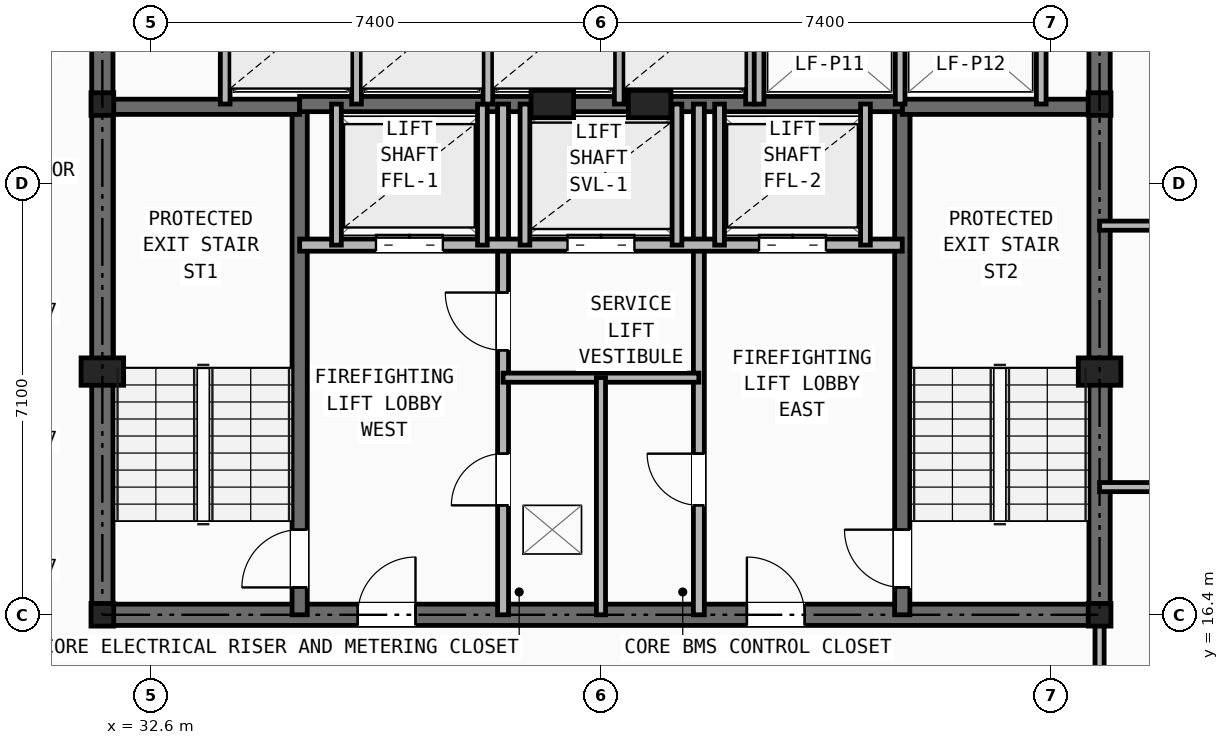
"""IFC4 building model, lengths in metres.
Left out: names, types, materials, properties, quantities, classifications, styles, units other than length and angle.
Written with IfcOpenShell. Run it as: python <this file> out.ifc"""

import sys

from ifc_helpers import new_model, si_unit, direction, frame, frame_2d, origin, origin_2d, place, context, subcontext, project, spatial, rectangle, i_section, extrude, element, fill, save


model = new_model("IFC4")
c1 = context("Model", 3, precision=1e-05, world=origin(), true_north=direction((0.0, 1.0)))
c2 = subcontext(c1, "Body", "Model", "MODEL_VIEW")
j1 = project(units=[si_unit("LENGTHUNIT", "METRE"), si_unit("PLANEANGLEUNIT", "RADIAN")], contexts=[c1])
p1 = place(None, origin())
s1 = spatial("IfcSite", under=j1, at=p1, CompositionType="ELEMENT")
p2 = place(p1, origin())
s2 = spatial("IfcBuilding", under=s1, at=p2, CompositionType="ELEMENT")
p3 = place(p2, frame((0.0, 0.0, 165.45)))
s3 = spatial("IfcBuildingStorey", under=s2, at=p3, CompositionType="ELEMENT", Elevation=165.45)
for number, where, z_axis, x_axis in (
    (1, (31.8, 16.4, 0.0), (0.0, 0.0, 1.0), (1.0, 0.0, 0.0)),
    (2, (48.2, 16.4, 0.0), (0.0, 0.0, 1.0), (1.0, 0.0, 0.0)),
    (3, (31.8, 24.8, 0.0), (0.0, 0.0, 1.0), (1.0, 0.0, 0.0)),
    (4, (48.2, 24.8, 0.0), (0.0, 0.0, 1.0), (1.0, 0.0, 0.0)),
):
    element("IfcColumn", number, at=place(p3, frame(where, z_axis=z_axis, x_axis=x_axis)), inside=s3, PredefinedType="COLUMN", context=c2, shape_type="SweptSolid", body=[
        extrude(i_section(OverallWidth=0.374, OverallDepth=0.372, WebThickness=0.016, FlangeThickness=0.026, at=origin_2d()), origin(), (0.0, 0.0, 1.0), 3.45),
    ])
for number, where, z_axis, x_axis in (
    (5, (31.8, 20.4, 0.0), (0.0, 0.0, 1.0), (1.0, 0.0, 0.0)),
    (6, (48.2, 20.4, 0.0), (0.0, 0.0, 1.0), (1.0, 0.0, 0.0)),
    (7, (39.2, 24.8, 0.0), (0.0, 0.0, 1.0), (1.0, 0.0, 0.0)),
    (8, (40.8, 24.8, 0.0), (0.0, 0.0, 1.0), (1.0, 0.0, 0.0)),
):
    element("IfcColumn", number, at=place(p3, frame(where, z_axis=z_axis, x_axis=x_axis)), inside=s3, PredefinedType="PILASTER", context=c2, shape_type="SweptSolid", body=[
        extrude(rectangle(XDim=0.7, YDim=0.45, at=origin_2d()), origin(), (0.0, 0.0, 1.0), 3.45),
    ])
p4 = place(p3, frame((31.8, 16.4, 0.0), z_axis=(0.0, 0.0, 1.0), x_axis=(1.0, 0.0, 0.0)))
e9 = element("IfcWall", 9, at=p4, inside=s3, PredefinedType="SHEAR", context=c2, shape_type="SweptSolid", body=[
    extrude(rectangle(XDim=16.4, YDim=0.35, at=frame_2d((8.2, 0.0))), origin(), (0.0, 0.0, 1.0), 3.21),
])
p5 = place(p4, frame((4.2, 0.0, 0.0)))
e10 = element("IfcOpeningElement", 10, at=p5, cuts=e9, PredefinedType="OPENING", context=c2, shape_type="SweptSolid", body=[
    extrude(rectangle(XDim=0.95, YDim=2.1, at=frame_2d((0.475, 1.05))), frame((0.0, 0.185, 0.0), z_axis=(0.0, -1.0, 0.0), x_axis=(1.0, 0.0, 0.0)), (0.0, 0.0, 1.0), 0.37),
])
p6 = place(p4, frame((10.6, 0.0, 0.0)))
e11 = element("IfcOpeningElement", 11, at=p6, cuts=e9, PredefinedType="OPENING", context=c2, shape_type="SweptSolid", body=[
    extrude(rectangle(XDim=0.95, YDim=2.1, at=frame_2d((0.475, 1.05))), frame((0.0, 0.185, 0.0), z_axis=(0.0, -1.0, 0.0), x_axis=(1.0, 0.0, 0.0)), (0.0, 0.0, 1.0), 0.37),
])
p7 = place(p3, frame((31.8, 16.4, 0.0), z_axis=(0.0, 0.0, 1.0), x_axis=(0.0, 1.0, 0.0)))
e12 = element("IfcWall", 12, at=p7, inside=s3, PredefinedType="SHEAR", context=c2, shape_type="SweptSolid", body=[
    extrude(rectangle(XDim=14.8, YDim=0.35, at=frame_2d((7.4, 0.0))), origin(), (0.0, 0.0, 1.0), 3.21),
])
p8 = place(p7, frame((11.0, 0.0, 0.0)))
e13 = element("IfcOpeningElement", 13, at=p8, cuts=e12, PredefinedType="OPENING", context=c2, shape_type="SweptSolid", body=[
    extrude(rectangle(XDim=1.1, YDim=2.15, at=frame_2d((0.55, 1.075))), frame((0.0, 0.185, 0.0), z_axis=(0.0, -1.0, 0.0), x_axis=(1.0, 0.0, 0.0)), (0.0, 0.0, 1.0), 0.37),
])
p9 = place(p3, frame((48.2, 16.4, 0.0), z_axis=(0.0, 0.0, 1.0), x_axis=(0.0, 1.0, 0.0)))
e14 = element("IfcWall", 14, at=p9, inside=s3, PredefinedType="SHEAR", context=c2, shape_type="SweptSolid", body=[
    extrude(rectangle(XDim=14.8, YDim=0.35, at=frame_2d((7.4, 0.0))), origin(), (0.0, 0.0, 1.0), 3.21),
])
p10 = place(p9, frame((11.0, 0.0, 0.0)))
e15 = element("IfcOpeningElement", 15, at=p10, cuts=e14, PredefinedType="OPENING", context=c2, shape_type="SweptSolid", body=[
    extrude(rectangle(XDim=1.1, YDim=2.15, at=frame_2d((0.55, 1.075))), frame((0.0, 0.185, 0.0), z_axis=(0.0, -1.0, 0.0), x_axis=(1.0, 0.0, 0.0)), (0.0, 0.0, 1.0), 0.37),
])
p11 = place(p3, frame((35.045, 16.4, 0.0), z_axis=(0.0, 0.0, 1.0), x_axis=(0.0, 1.0, 0.0)))
e16 = element("IfcWall", 16, at=p11, inside=s3, PredefinedType="SHEAR", context=c2, shape_type="SweptSolid", body=[
    extrude(rectangle(XDim=8.4, YDim=0.25, at=frame_2d((4.2, 0.0))), origin(), (0.0, 0.0, 1.0), 3.21),
])
p12 = place(p11, frame((0.45, 0.0, 0.0)))
e17 = element("IfcOpeningElement", 17, at=p12, cuts=e16, PredefinedType="OPENING", context=c2, shape_type="SweptSolid", body=[
    extrude(rectangle(XDim=0.95, YDim=2.1, at=frame_2d((0.475, 1.05))), frame((0.0, 0.135, 0.0), z_axis=(0.0, -1.0, 0.0), x_axis=(1.0, 0.0, 0.0)), (0.0, 0.0, 1.0), 0.27),
])
p13 = place(p3, frame((31.8, 24.755, 0.0), z_axis=(0.0, 0.0, 1.0), x_axis=(1.0, 0.0, 0.0)))
e18 = element("IfcWall", 18, at=p13, inside=s3, PredefinedType="SHEAR", context=c2, shape_type="SweptSolid", body=[
    extrude(rectangle(XDim=3.245, YDim=0.25, at=frame_2d((1.623, 0.0))), origin(), (0.0, 0.0, 1.0), 3.21),
])
p14 = place(p3, frame((44.955, 16.4, 0.0), z_axis=(0.0, 0.0, 1.0), x_axis=(0.0, 1.0, 0.0)))
e19 = element("IfcWall", 19, at=p14, inside=s3, PredefinedType="SHEAR", context=c2, shape_type="SweptSolid", body=[
    extrude(rectangle(XDim=8.4, YDim=0.25, at=frame_2d((4.2, 0.0))), origin(), (0.0, 0.0, 1.0), 3.21),
])
p15 = place(p14, frame((0.45, 0.0, 0.0)))
e20 = element("IfcOpeningElement", 20, at=p15, cuts=e19, PredefinedType="OPENING", context=c2, shape_type="SweptSolid", body=[
    extrude(rectangle(XDim=0.95, YDim=2.1, at=frame_2d((0.475, 1.05))), frame((0.0, 0.135, 0.0), z_axis=(0.0, -1.0, 0.0), x_axis=(1.0, 0.0, 0.0)), (0.0, 0.0, 1.0), 0.27),
])
p16 = place(p3, frame((44.955, 24.755, 0.0), z_axis=(0.0, 0.0, 1.0), x_axis=(1.0, 0.0, 0.0)))
e21 = element("IfcWall", 21, at=p16, inside=s3, PredefinedType="SHEAR", context=c2, shape_type="SweptSolid", body=[
    extrude(rectangle(XDim=3.245, YDim=0.25, at=frame_2d((1.623, 0.0))), origin(), (0.0, 0.0, 1.0), 3.21),
])
p17 = place(p3, frame((35.045, 24.8, 0.0), z_axis=(0.0, 0.0, 1.0), x_axis=(1.0, 0.0, 0.0)))
e22 = element("IfcWall", 22, at=p17, inside=s3, PredefinedType="SHEAR", context=c2, shape_type="SweptSolid", body=[
    extrude(rectangle(XDim=9.91, YDim=0.25, at=frame_2d((4.955, 0.0))), origin(), (0.0, 0.0, 1.0), 3.21),
])
p18 = place(p3, frame((38.39, 16.4, 0.0), z_axis=(0.0, 0.0, 1.0), x_axis=(0.0, 1.0, 0.0)))
e23 = element("IfcWall", 23, at=p18, inside=s3, PredefinedType="PARTITIONING", context=c2, shape_type="SweptSolid", body=[
    extrude(rectangle(XDim=8.4, YDim=0.18, at=frame_2d((4.2, 0.0))), origin(), (0.0, 0.0, 1.0), 2.665),
])
p19 = place(p18, frame((1.8, 0.0, 0.0)))
e24 = element("IfcOpeningElement", 24, at=p19, cuts=e23, PredefinedType="OPENING", context=c2, shape_type="SweptSolid", body=[
    extrude(rectangle(XDim=0.85, YDim=2.05, at=frame_2d((0.425, 1.025))), frame((0.0, 0.1, 0.0), z_axis=(0.0, -1.0, 0.0), x_axis=(1.0, 0.0, 0.0)), (0.0, 0.0, 1.0), 0.2),
])
p20 = place(p18, frame((4.35, 0.0, 0.0)))
e25 = element("IfcOpeningElement", 25, at=p20, cuts=e23, PredefinedType="OPENING", context=c2, shape_type="SweptSolid", body=[
    extrude(rectangle(XDim=0.95, YDim=2.1, at=frame_2d((0.475, 1.05))), frame((0.0, 0.1, 0.0), z_axis=(0.0, -1.0, 0.0), x_axis=(1.0, 0.0, 0.0)), (0.0, 0.0, 1.0), 0.2),
])
p21 = place(p3, frame((41.61, 16.4, 0.0), z_axis=(0.0, 0.0, 1.0), x_axis=(0.0, 1.0, 0.0)))
e26 = element("IfcWall", 26, at=p21, inside=s3, PredefinedType="PARTITIONING", context=c2, shape_type="SweptSolid", body=[
    extrude(rectangle(XDim=8.4, YDim=0.18, at=frame_2d((4.2, 0.0))), origin(), (0.0, 0.0, 1.0), 2.665),
])
p22 = place(p21, frame((1.8, 0.0, 0.0)))
e27 = element("IfcOpeningElement", 27, at=p22, cuts=e26, PredefinedType="OPENING", context=c2, shape_type="SweptSolid", body=[
    extrude(rectangle(XDim=0.85, YDim=2.05, at=frame_2d((0.425, 1.025))), frame((0.0, 0.1, 0.0), z_axis=(0.0, -1.0, 0.0), x_axis=(1.0, 0.0, 0.0)), (0.0, 0.0, 1.0), 0.2),
])
p23 = place(p3, frame((35.045, 22.48, 0.0), z_axis=(0.0, 0.0, 1.0), x_axis=(1.0, 0.0, 0.0)))
e28 = element("IfcWall", 28, at=p23, inside=s3, PredefinedType="SOLIDWALL", context=c2, shape_type="SweptSolid", body=[
    extrude(rectangle(XDim=9.91, YDim=0.2, at=frame_2d((4.955, 0.0))), origin(), (0.0, 0.0, 1.0), 3.21),
])
p24 = place(p23, frame((1.255, 0.0, 0.0)))
e29 = element("IfcOpeningElement", 29, at=p24, cuts=e28, PredefinedType="OPENING", context=c2, shape_type="SweptSolid", body=[
    extrude(rectangle(XDim=1.1, YDim=2.15, at=frame_2d((0.55, 1.075))), frame((0.0, 0.11, 0.0), z_axis=(0.0, -1.0, 0.0), x_axis=(1.0, 0.0, 0.0)), (0.0, 0.0, 1.0), 0.22),
])
p25 = place(p23, frame((7.555, 0.0, 0.0)))
e30 = element("IfcOpeningElement", 30, at=p25, cuts=e28, PredefinedType="OPENING", context=c2, shape_type="SweptSolid", body=[
    extrude(rectangle(XDim=1.1, YDim=2.15, at=frame_2d((0.55, 1.075))), frame((0.0, 0.11, 0.0), z_axis=(0.0, -1.0, 0.0), x_axis=(1.0, 0.0, 0.0)), (0.0, 0.0, 1.0), 0.22),
])
p26 = place(p23, frame((4.405, 0.0, 0.0)))
e31 = element("IfcOpeningElement", 31, at=p26, cuts=e28, PredefinedType="OPENING", context=c2, shape_type="SweptSolid", body=[
    extrude(rectangle(XDim=1.1, YDim=2.15, at=frame_2d((0.55, 1.075))), frame((0.0, 0.11, 0.0), z_axis=(0.0, -1.0, 0.0), x_axis=(1.0, 0.0, 0.0)), (0.0, 0.0, 1.0), 0.22),
])
p27 = place(p3, frame((38.39, 20.3, 0.0), z_axis=(0.0, 0.0, 1.0), x_axis=(1.0, 0.0, 0.0)))
e32 = element("IfcWall", 32, at=p27, inside=s3, PredefinedType="PARTITIONING", context=c2, shape_type="SweptSolid", body=[
    extrude(rectangle(XDim=3.22, YDim=0.15, at=frame_2d((1.61, 0.0))), origin(), (0.0, 0.0, 1.0), 3.21),
])
p28 = place(p3, frame((40.0, 16.4, 0.0), z_axis=(0.0, 0.0, 1.0), x_axis=(0.0, 1.0, 0.0)))
e33 = element("IfcWall", 33, at=p28, inside=s3, PredefinedType="PARTITIONING", context=c2, shape_type="SweptSolid", body=[
    extrude(rectangle(XDim=3.9, YDim=0.15, at=frame_2d((1.95, 0.0))), origin(), (0.0, 0.0, 1.0), 2.665),
])
for number, where, z_axis, x_axis in (
    (34, (35.65, 22.48, 0.0), (0.0, 0.0, 1.0), (0.0, 1.0, 0.0)),
    (35, (38.05, 22.48, 0.0), (0.0, 0.0, 1.0), (0.0, 1.0, 0.0)),
    (36, (41.95, 22.48, 0.0), (0.0, 0.0, 1.0), (0.0, 1.0, 0.0)),
    (37, (44.35, 22.48, 0.0), (0.0, 0.0, 1.0), (0.0, 1.0, 0.0)),
    (38, (38.75, 22.48, 0.0), (0.0, 0.0, 1.0), (0.0, 1.0, 0.0)),
    (39, (41.25, 22.48, 0.0), (0.0, 0.0, 1.0), (0.0, 1.0, 0.0)),
):
    element("IfcWall", number, at=place(p3, frame(where, z_axis=z_axis, x_axis=x_axis)), inside=s3, PredefinedType="SOLIDWALL", context=c2, shape_type="SweptSolid", body=[
        extrude(rectangle(XDim=2.32, YDim=0.16, at=frame_2d((1.16, 0.0))), origin(), (0.0, 0.0, 1.0), 3.21),
    ])
for number, where, z_axis, x_axis in (
    (40, (33.82, 24.8, 0.0), (0.0, 0.0, 1.0), (0.0, 1.0, 0.0)),
    (41, (35.98, 24.8, 0.0), (0.0, 0.0, 1.0), (0.0, 1.0, 0.0)),
    (42, (38.14, 24.8, 0.0), (0.0, 0.0, 1.0), (0.0, 1.0, 0.0)),
    (43, (40.3, 24.8, 0.0), (0.0, 0.0, 1.0), (0.0, 1.0, 0.0)),
    (44, (42.46, 24.8, 0.0), (0.0, 0.0, 1.0), (0.0, 1.0, 0.0)),
    (45, (42.6, 24.8, 0.0), (0.0, 0.0, 1.0), (0.0, 1.0, 0.0)),
    (46, (44.92, 24.8, 0.0), (0.0, 0.0, 1.0), (0.0, 1.0, 0.0)),
    (47, (47.24, 24.8, 0.0), (0.0, 0.0, 1.0), (0.0, 1.0, 0.0)),
):
    element("IfcWall", number, at=place(p3, frame(where, z_axis=z_axis, x_axis=x_axis)), inside=s3, PredefinedType="SOLIDWALL", context=c2, shape_type="SweptSolid", body=[
        extrude(rectangle(XDim=2.08, YDim=0.16, at=frame_2d((1.04, 0.0))), origin(), (0.0, 0.0, 1.0), 3.21),
    ])
p29 = place(p3, frame((48.2, 14.1, 0.0), z_axis=(0.0, 0.0, 1.0), x_axis=(0.0, 1.0, 0.0)))
e48 = element("IfcWall", 48, at=p29, inside=s3, PredefinedType="PARTITIONING", context=c2, shape_type="SweptSolid", body=[
    extrude(rectangle(XDim=2.3, YDim=0.15, at=frame_2d((1.15, 0.0))), origin(), (0.0, 0.0, 1.0), 2.665),
])
p30 = place(p3, frame((48.2, 18.5, 0.0), z_axis=(0.0, 0.0, 1.0), x_axis=(1.0, 0.0, 0.0)))
e49 = element("IfcWall", 49, at=p30, inside=s3, PredefinedType="PARTITIONING", context=c2, shape_type="SweptSolid", body=[
    extrude(rectangle(XDim=15.585, YDim=0.15, at=frame_2d((7.792, 0.0))), origin(), (0.0, 0.0, 1.0), 2.589),
])
p31 = place(p30, frame((1.4, 0.0, 0.0)))
e50 = element("IfcOpeningElement", 50, at=p31, cuts=e49, PredefinedType="OPENING", context=c2, shape_type="SweptSolid", body=[
    extrude(rectangle(XDim=0.95, YDim=2.1, at=frame_2d((0.475, 1.05))), frame((0.0, 0.085, 0.0), z_axis=(0.0, -1.0, 0.0), x_axis=(1.0, 0.0, 0.0)), (0.0, 0.0, 1.0), 0.17),
])
p32 = place(p3, frame((48.2, 22.8, 0.0), z_axis=(0.0, 0.0, 1.0), x_axis=(1.0, 0.0, 0.0)))
e51 = element("IfcWall", 51, at=p32, inside=s3, PredefinedType="PARTITIONING", context=c2, shape_type="SweptSolid", body=[
    extrude(rectangle(XDim=12.924, YDim=0.15, at=frame_2d((6.462, 0.0))), origin(), (0.0, 0.0, 1.0), 2.589),
])
p33 = place(p32, frame((1.4, 0.0, 0.0)))
e52 = element("IfcOpeningElement", 52, at=p33, cuts=e51, PredefinedType="OPENING", context=c2, shape_type="SweptSolid", body=[
    extrude(rectangle(XDim=0.95, YDim=2.1, at=frame_2d((0.475, 1.05))), frame((0.0, 0.085, 0.0), z_axis=(0.0, -1.0, 0.0), x_axis=(1.0, 0.0, 0.0)), (0.0, 0.0, 1.0), 0.17),
])
p34 = place(p19, origin())
e53 = element("IfcDoor", 53, at=p34, inside=s3, OperationType="SINGLE_SWING_LEFT", PredefinedType="DOOR", context=c2, shape_type="SweptSolid", body=[
    extrude(rectangle(XDim=0.85, YDim=2.05, at=frame_2d((0.425, 1.025))), frame((0.0, 0.025, 0.0), z_axis=(0.0, -1.0, 0.0), x_axis=(1.0, 0.0, 0.0)), (0.0, 0.0, 1.0), 0.05),
])
fill(e24, e53)
p35 = place(p22, origin())
e54 = element("IfcDoor", 54, at=p35, inside=s3, OperationType="SINGLE_SWING_RIGHT", PredefinedType="DOOR", context=c2, shape_type="SweptSolid", body=[
    extrude(rectangle(XDim=0.85, YDim=2.05, at=frame_2d((0.425, 1.025))), frame((0.0, 0.025, 0.0), z_axis=(0.0, -1.0, 0.0), x_axis=(1.0, 0.0, 0.0)), (0.0, 0.0, 1.0), 0.05),
])
fill(e27, e54)
p36 = place(p20, origin())
e55 = element("IfcDoor", 55, at=p36, inside=s3, OperationType="SINGLE_SWING_RIGHT", PredefinedType="DOOR", context=c2, shape_type="SweptSolid", body=[
    extrude(rectangle(XDim=0.95, YDim=2.1, at=frame_2d((0.475, 1.05))), frame((0.0, 0.025, 0.0), z_axis=(0.0, -1.0, 0.0), x_axis=(1.0, 0.0, 0.0)), (0.0, 0.0, 1.0), 0.05),
])
fill(e25, e55)
p37 = place(p12, origin())
e56 = element("IfcDoor", 56, at=p37, inside=s3, OperationType="SINGLE_SWING_LEFT", PredefinedType="DOOR", context=c2, shape_type="SweptSolid", body=[
    extrude(rectangle(XDim=0.95, YDim=2.1, at=frame_2d((0.475, 1.05))), frame((0.0, 0.025, 0.0), z_axis=(0.0, -1.0, 0.0), x_axis=(1.0, 0.0, 0.0)), (0.0, 0.0, 1.0), 0.05),
])
fill(e17, e56)
p38 = place(p15, origin())
e57 = element("IfcDoor", 57, at=p38, inside=s3, OperationType="SINGLE_SWING_RIGHT", PredefinedType="DOOR", context=c2, shape_type="SweptSolid", body=[
    extrude(rectangle(XDim=0.95, YDim=2.1, at=frame_2d((0.475, 1.05))), frame((0.0, 0.025, 0.0), z_axis=(0.0, -1.0, 0.0), x_axis=(1.0, 0.0, 0.0)), (0.0, 0.0, 1.0), 0.05),
])
fill(e20, e57)
p39 = place(p5, origin())
e58 = element("IfcDoor", 58, at=p39, inside=s3, OperationType="SINGLE_SWING_RIGHT", PredefinedType="DOOR", context=c2, shape_type="SweptSolid", body=[
    extrude(rectangle(XDim=0.95, YDim=2.1, at=frame_2d((0.475, 1.05))), frame((0.0, 0.025, 0.0), z_axis=(0.0, -1.0, 0.0), x_axis=(1.0, 0.0, 0.0)), (0.0, 0.0, 1.0), 0.05),
])
fill(e10, e58)
p40 = place(p6, origin())
e59 = element("IfcDoor", 59, at=p40, inside=s3, OperationType="SINGLE_SWING_LEFT", PredefinedType="DOOR", context=c2, shape_type="SweptSolid", body=[
    extrude(rectangle(XDim=0.95, YDim=2.1, at=frame_2d((0.475, 1.05))), frame((0.0, 0.025, 0.0), z_axis=(0.0, -1.0, 0.0), x_axis=(1.0, 0.0, 0.0)), (0.0, 0.0, 1.0), 0.05),
])
fill(e11, e59)
p41 = place(p24, origin())
e60 = element("IfcDoor", 60, at=p41, inside=s3, OperationType="DOUBLE_DOOR_SLIDING", PredefinedType="DOOR", context=c2, shape_type="SweptSolid", body=[
    extrude(rectangle(XDim=1.1, YDim=2.15, at=frame_2d((0.55, 1.075))), frame((0.0, 0.025, 0.0), z_axis=(0.0, -1.0, 0.0), x_axis=(1.0, 0.0, 0.0)), (0.0, 0.0, 1.0), 0.05),
])
fill(e29, e60)
p42 = place(p25, origin())
e61 = element("IfcDoor", 61, at=p42, inside=s3, OperationType="DOUBLE_DOOR_SLIDING", PredefinedType="DOOR", context=c2, shape_type="SweptSolid", body=[
    extrude(rectangle(XDim=1.1, YDim=2.15, at=frame_2d((0.55, 1.075))), frame((0.0, 0.025, 0.0), z_axis=(0.0, -1.0, 0.0), x_axis=(1.0, 0.0, 0.0)), (0.0, 0.0, 1.0), 0.05),
])
fill(e30, e61)
p43 = place(p26, origin())
e62 = element("IfcDoor", 62, at=p43, inside=s3, OperationType="DOUBLE_DOOR_SLIDING", PredefinedType="DOOR", context=c2, shape_type="SweptSolid", body=[
    extrude(rectangle(XDim=1.1, YDim=2.15, at=frame_2d((0.55, 1.075))), frame((0.0, 0.025, 0.0), z_axis=(0.0, -1.0, 0.0), x_axis=(1.0, 0.0, 0.0)), (0.0, 0.0, 1.0), 0.05),
])
fill(e31, e62)
save(model, sys.argv[1])
